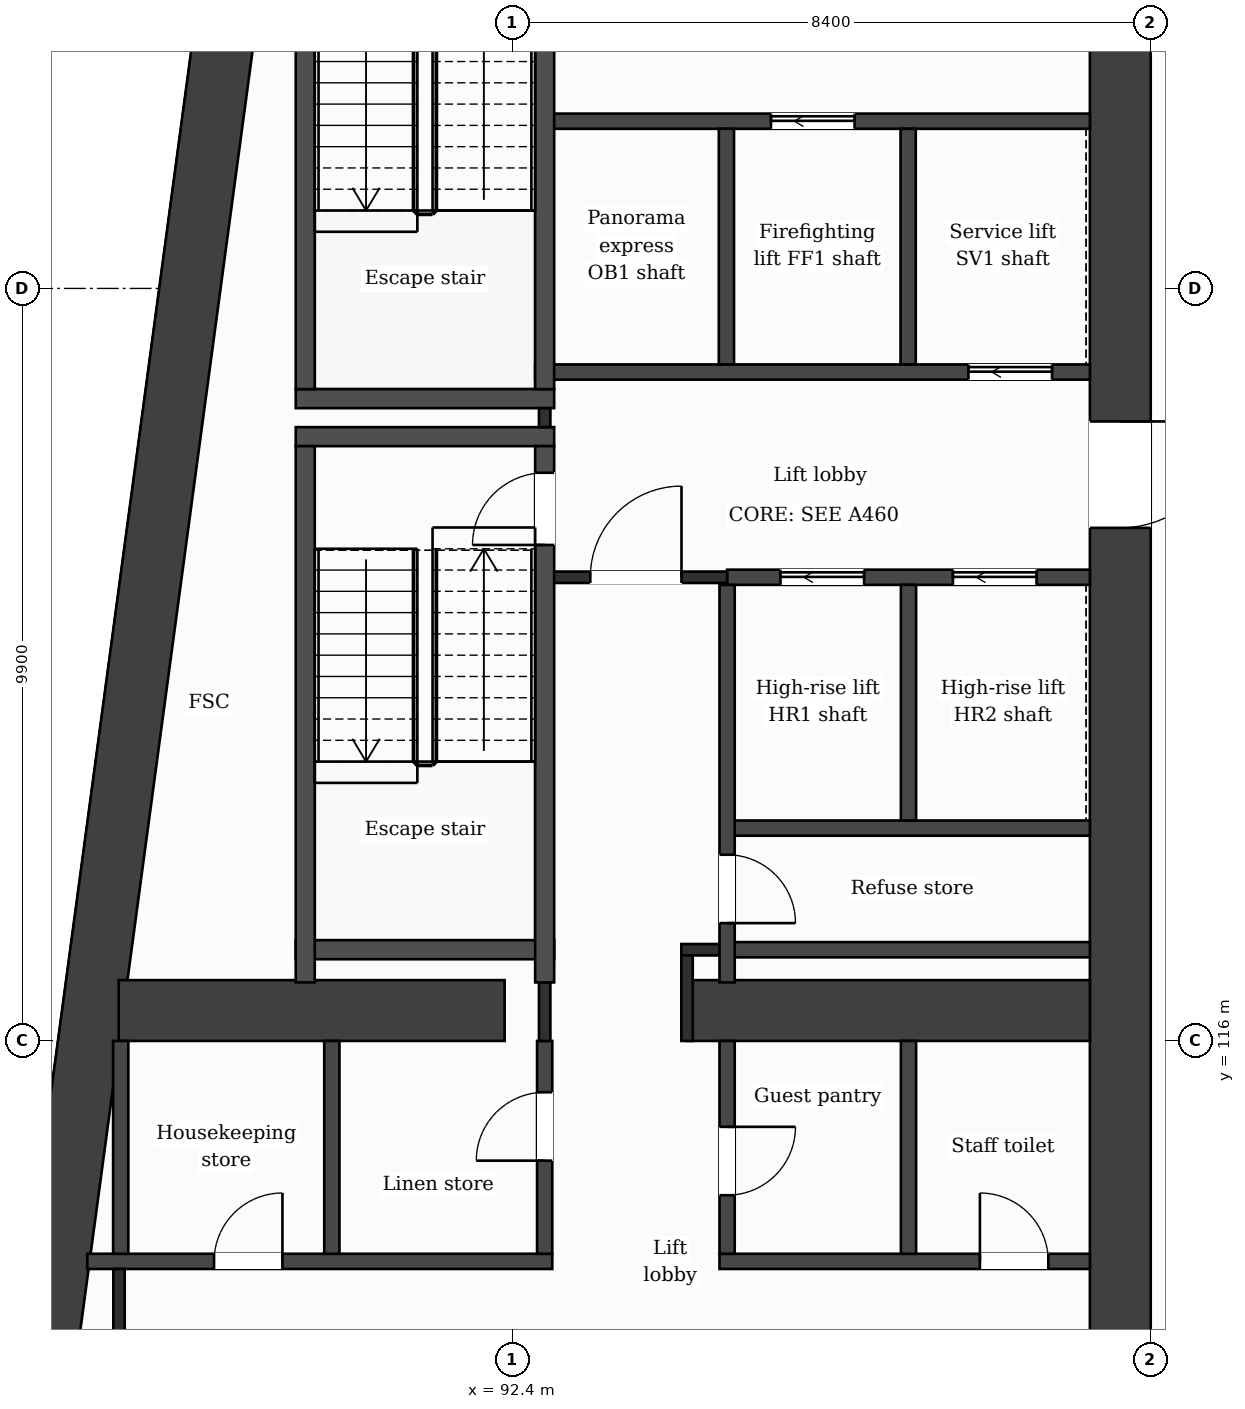
"""IFC4 building model, lengths in metres.
Left out: names, types, materials, properties, quantities, classifications, styles, units other than length and angle.
Written with IfcOpenShell. Run it as: python <this file> out.ifc"""

import sys

from ifc_helpers import new_model, si_unit, direction, frame, frame_2d, origin, place, context, subcontext, project, spatial, rectangle, extrude, element, fill, save


model = new_model("IFC4")
c1 = context("Model", 3, precision=1e-05, world=origin(), true_north=direction((0.0, 1.0)))
c2 = subcontext(c1, "Body", "Model", "MODEL_VIEW")
j1 = project(units=[si_unit("LENGTHUNIT", "METRE"), si_unit("PLANEANGLEUNIT", "RADIAN")], contexts=[c1])
p1 = place(None, origin())
s1 = spatial("IfcSite", under=j1, at=p1, CompositionType="ELEMENT")
p2 = place(p1, origin())
s2 = spatial("IfcBuilding", under=s1, at=p2, CompositionType="ELEMENT")
p3 = place(p2, frame((0.0, 0.0, 242.9)))
s3 = spatial("IfcBuildingStorey", under=s2, at=p3, CompositionType="ELEMENT", Elevation=242.9)
p4 = place(p3, frame((100.4, 132.0, 0.0), z_axis=(0.0, 0.0, 1.0), x_axis=(0.0, -1.0, 0.0)))
e1 = element("IfcWall", 1, at=p4, inside=s3, PredefinedType="SHEAR", context=c2, shape_type="SweptSolid", body=[
    extrude(rectangle(XDim=21.2, YDim=0.8, at=frame_2d((10.6, 0.0))), origin(), (0.0, 0.0, 1.0), 3.7),
])
p5 = place(p4, frame((7.85, 0.0, 0.0)))
e2 = element("IfcOpeningElement", 2, at=p5, cuts=e1, PredefinedType="OPENING", context=c2, shape_type="SweptSolid", body=[
    extrude(rectangle(XDim=1.4, YDim=2.1, at=frame_2d((0.7, 1.05))), frame((0.0, 0.41, 0.0), z_axis=(0.0, -1.0, 0.0), x_axis=(1.0, 0.0, 0.0)), (0.0, 0.0, 1.0), 0.82),
])
p6 = place(p3, frame((86.127, 110.8, 0.0), z_axis=(0.0, 0.0, 1.0), x_axis=(0.133408347329, 0.991061154956, 0.0)))
e3 = element("IfcWall", 3, at=p6, inside=s3, PredefinedType="SHEAR", context=c2, shape_type="SweptSolid", body=[
    extrude(rectangle(XDim=21.391, YDim=0.8, at=frame_2d((10.696, 0.0))), origin(), (0.0, 0.0, 1.0), 3.7),
])
p7 = place(p3, frame((87.223, 116.4, 0.0), z_axis=(0.0, 0.0, 1.0), x_axis=(1.0, 0.0, 0.0)))
e4 = element("IfcWall", 4, at=p7, inside=s3, PredefinedType="SHEAR", context=c2, shape_type="SweptSolid", body=[
    extrude(rectangle(XDim=5.077, YDim=0.8, at=frame_2d((2.539, 0.0))), origin(), (0.0, 0.0, 1.0), 3.7),
])
p8 = place(p3, frame((94.7, 116.4, 0.0), z_axis=(0.0, 0.0, 1.0), x_axis=(1.0, 0.0, 0.0)))
e5 = element("IfcWall", 5, at=p8, inside=s3, PredefinedType="SHEAR", context=c2, shape_type="SweptSolid", body=[
    extrude(rectangle(XDim=5.3, YDim=0.8, at=frame_2d((2.65, 0.0))), origin(), (0.0, 0.0, 1.0), 3.7),
])
p9 = place(p3, frame((86.81, 113.1, 0.0), z_axis=(0.0, 0.0, 1.0), x_axis=(1.0, 0.0, 0.0)))
e6 = element("IfcWall", 6, at=p9, inside=s3, PredefinedType="PARTITIONING", context=c2, shape_type="SweptSolid", body=[
    extrude(rectangle(XDim=6.117, YDim=0.2, at=frame_2d((3.059, 0.0))), origin(), (0.0, 0.0, 1.0), 3.2),
])
p10 = place(p9, frame((1.667, 0.0, 0.0)))
e7 = element("IfcOpeningElement", 7, at=p10, cuts=e6, PredefinedType="OPENING", context=c2, shape_type="SweptSolid", body=[
    extrude(rectangle(XDim=0.9, YDim=2.1, at=frame_2d((0.45, 1.05))), frame((0.0, 0.11, 0.0), z_axis=(0.0, -1.0, 0.0), x_axis=(1.0, 0.0, 0.0)), (0.0, 0.0, 1.0), 0.22),
])
p11 = place(p3, frame((95.127, 113.1, 0.0), z_axis=(0.0, 0.0, 1.0), x_axis=(1.0, 0.0, 0.0)))
e8 = element("IfcWall", 8, at=p11, inside=s3, PredefinedType="PARTITIONING", context=c2, shape_type="SweptSolid", body=[
    extrude(rectangle(XDim=4.873, YDim=0.2, at=frame_2d((2.437, 0.0))), origin(), (0.0, 0.0, 1.0), 3.2),
])
p12 = place(p11, frame((3.426, 0.0, 0.0)))
e9 = element("IfcOpeningElement", 9, at=p12, cuts=e8, PredefinedType="OPENING", context=c2, shape_type="SweptSolid", body=[
    extrude(rectangle(XDim=0.9, YDim=2.1, at=frame_2d((0.45, 1.05))), frame((0.0, 0.11, 0.0), z_axis=(0.0, -1.0, 0.0), x_axis=(1.0, 0.0, 0.0)), (0.0, 0.0, 1.0), 0.22),
])
p13 = place(p3, frame((95.227, 117.2, 0.0), z_axis=(0.0, 0.0, 1.0), x_axis=(1.0, 0.0, 0.0)))
e10 = element("IfcWall", 10, at=p13, inside=s3, PredefinedType="PARTITIONING", context=c2, shape_type="SweptSolid", body=[
    extrude(rectangle(XDim=4.773, YDim=0.2, at=frame_2d((2.386, 0.0))), origin(), (0.0, 0.0, 1.0), 3.2),
])
p14 = place(p3, frame((94.625, 117.2, 0.0), z_axis=(0.0, 0.0, 1.0), x_axis=(1.0, 0.0, 0.0)))
e11 = element("IfcWall", 11, at=p14, inside=s3, PredefinedType="PARTITIONING", context=c2, shape_type="SweptSolid", body=[
    extrude(rectangle(XDim=0.602, YDim=0.15, at=frame_2d((0.301, 0.0))), origin(), (0.0, 0.0, 1.0), 3.2),
])
p15 = place(p3, frame((89.552, 117.2, 0.0), z_axis=(0.0, 0.0, 1.0), x_axis=(1.0, 0.0, 0.0)))
e12 = element("IfcWall", 12, at=p15, inside=s3, PredefinedType="PARTITIONING", context=c2, shape_type="SweptSolid", body=[
    extrude(rectangle(XDim=3.4, YDim=0.25, at=frame_2d((1.7, 0.0))), origin(), (0.0, 0.0, 1.0), 3.2),
])
p16 = place(p3, frame((95.227, 118.8, 0.0), z_axis=(0.0, 0.0, 1.0), x_axis=(1.0, 0.0, 0.0)))
e13 = element("IfcWall", 13, at=p16, inside=s3, PredefinedType="PARTITIONING", context=c2, shape_type="SweptSolid", body=[
    extrude(rectangle(XDim=4.773, YDim=0.2, at=frame_2d((2.386, 0.0))), origin(), (0.0, 0.0, 1.0), 3.2),
])
p17 = place(p3, frame((95.227, 122.1, 0.0), z_axis=(0.0, 0.0, 1.0), x_axis=(1.0, 0.0, 0.0)))
e14 = element("IfcWall", 14, at=p17, inside=s3, PredefinedType="PARTITIONING", context=c2, shape_type="SweptSolid", body=[
    extrude(rectangle(XDim=4.773, YDim=0.2, at=frame_2d((2.386, 0.0))), origin(), (0.0, 0.0, 1.0), 3.2),
])
p18 = place(p17, frame((0.702, 0.0, 0.0)))
e15 = element("IfcOpeningElement", 15, at=p18, cuts=e14, PredefinedType="OPENING", context=c2, shape_type="SweptSolid", body=[
    extrude(rectangle(XDim=1.1, YDim=2.1, at=frame_2d((0.55, 1.05))), frame((0.0, 0.11, 0.0), z_axis=(0.0, -1.0, 0.0), x_axis=(1.0, 0.0, 0.0)), (0.0, 0.0, 1.0), 0.22),
])
p19 = place(p17, frame((2.971, 0.0, 0.0)))
e16 = element("IfcOpeningElement", 16, at=p19, cuts=e14, PredefinedType="OPENING", context=c2, shape_type="SweptSolid", body=[
    extrude(rectangle(XDim=1.1, YDim=2.1, at=frame_2d((0.55, 1.05))), frame((0.0, 0.11, 0.0), z_axis=(0.0, -1.0, 0.0), x_axis=(1.0, 0.0, 0.0)), (0.0, 0.0, 1.0), 0.22),
])
p20 = place(p3, frame((92.827, 122.1, 0.0), z_axis=(0.0, 0.0, 1.0), x_axis=(1.0, 0.0, 0.0)))
e17 = element("IfcWall", 17, at=p20, inside=s3, PredefinedType="PARTITIONING", context=c2, shape_type="SweptSolid", body=[
    extrude(rectangle(XDim=2.4, YDim=0.15, at=frame_2d((1.2, 0.0))), origin(), (0.0, 0.0, 1.0), 3.2),
])
p21 = place(p20, frame((0.6, 0.0, 0.0)))
e18 = element("IfcOpeningElement", 18, at=p21, cuts=e17, PredefinedType="OPENING", context=c2, shape_type="SweptSolid", body=[
    extrude(rectangle(XDim=1.2, YDim=2.1, at=frame_2d((0.6, 1.05))), frame((0.0, 0.085, 0.0), z_axis=(0.0, -1.0, 0.0), x_axis=(1.0, 0.0, 0.0)), (0.0, 0.0, 1.0), 0.17),
])
for number, where, z_axis, x_axis in (
    (19, (89.552, 123.95, 0.0), (0.0, 0.0, 1.0), (1.0, 0.0, 0.0)),
    (20, (89.552, 124.45, 0.0), (0.0, 0.0, 1.0), (1.0, 0.0, 0.0)),
):
    element("IfcWall", number, at=place(p3, frame(where, z_axis=z_axis, x_axis=x_axis)), inside=s3, PredefinedType="PARTITIONING", context=c2, shape_type="SweptSolid", body=[
        extrude(rectangle(XDim=3.4, YDim=0.25, at=frame_2d((1.7, 0.0))), origin(), (0.0, 0.0, 1.0), 3.2),
    ])
p22 = place(p3, frame((92.702, 124.8, 0.0), z_axis=(0.0, 0.0, 1.0), x_axis=(1.0, 0.0, 0.0)))
e21 = element("IfcWall", 21, at=p22, inside=s3, PredefinedType="PARTITIONING", context=c2, shape_type="SweptSolid", body=[
    extrude(rectangle(XDim=7.298, YDim=0.2, at=frame_2d((3.649, 0.0))), origin(), (0.0, 0.0, 1.0), 3.2),
])
p23 = place(p22, frame((5.7, 0.0, 0.0)))
e22 = element("IfcOpeningElement", 22, at=p23, cuts=e21, PredefinedType="OPENING", context=c2, shape_type="SweptSolid", body=[
    extrude(rectangle(XDim=1.1, YDim=2.1, at=frame_2d((0.55, 1.05))), frame((0.0, 0.11, 0.0), z_axis=(0.0, -1.0, 0.0), x_axis=(1.0, 0.0, 0.0)), (0.0, 0.0, 1.0), 0.22),
])
p24 = place(p3, frame((92.827, 128.1, 0.0), z_axis=(0.0, 0.0, 1.0), x_axis=(1.0, 0.0, 0.0)))
e23 = element("IfcWall", 23, at=p24, inside=s3, PredefinedType="PARTITIONING", context=c2, shape_type="SweptSolid", body=[
    extrude(rectangle(XDim=7.173, YDim=0.2, at=frame_2d((3.586, 0.0))), origin(), (0.0, 0.0, 1.0), 3.2),
])
p25 = place(p24, frame((2.977, 0.0, 0.0)))
e24 = element("IfcOpeningElement", 24, at=p25, cuts=e23, PredefinedType="OPENING", context=c2, shape_type="SweptSolid", body=[
    extrude(rectangle(XDim=1.1, YDim=2.1, at=frame_2d((0.55, 1.05))), frame((0.0, 0.11, 0.0), z_axis=(0.0, -1.0, 0.0), x_axis=(1.0, 0.0, 0.0)), (0.0, 0.0, 1.0), 0.22),
])
p26 = place(p3, frame((87.25, 113.2, 0.0), z_axis=(0.0, 0.0, 1.0), x_axis=(0.0, 1.0, 0.0)))
e25 = element("IfcWall", 25, at=p26, inside=s3, PredefinedType="PARTITIONING", context=c2, shape_type="SweptSolid", body=[
    extrude(rectangle(XDim=2.8, YDim=0.2, at=frame_2d((1.4, 0.0))), origin(), (0.0, 0.0, 1.0), 3.2),
])
p27 = place(p3, frame((87.227, 111.2, 0.0), z_axis=(0.0, 0.0, 1.0), x_axis=(0.0, 1.0, 0.0)))
e26 = element("IfcWall", 26, at=p27, inside=s3, PredefinedType="PARTITIONING", context=c2, shape_type="SweptSolid", body=[
    extrude(rectangle(XDim=1.8, YDim=0.15, at=frame_2d((0.9, 0.0))), origin(), (0.0, 0.0, 1.0), 3.2),
])
for number, where, z_axis, x_axis in (
    (27, (89.677, 116.77, 0.0), (0.0, 0.0, 1.0), (0.0, 1.0, 0.0)),
    (28, (89.677, 124.575, 0.0), (0.0, 0.0, 1.0), (0.0, 1.0, 0.0)),
):
    element("IfcWall", number, at=place(p3, frame(where, z_axis=z_axis, x_axis=x_axis)), inside=s3, PredefinedType="PARTITIONING", context=c2, shape_type="SweptSolid", body=[
        extrude(rectangle(XDim=7.055, YDim=0.25, at=frame_2d((3.527, 0.0))), origin(), (0.0, 0.0, 1.0), 3.2),
    ])
p28 = place(p3, frame((90.027, 113.2, 0.0), z_axis=(0.0, 0.0, 1.0), x_axis=(0.0, 1.0, 0.0)))
e29 = element("IfcWall", 29, at=p28, inside=s3, PredefinedType="PARTITIONING", context=c2, shape_type="SweptSolid", body=[
    extrude(rectangle(XDim=2.8, YDim=0.2, at=frame_2d((1.4, 0.0))), origin(), (0.0, 0.0, 1.0), 3.2),
])
p29 = place(p3, frame((92.827, 113.2, 0.0), z_axis=(0.0, 0.0, 1.0), x_axis=(0.0, 1.0, 0.0)))
e30 = element("IfcWall", 30, at=p29, inside=s3, PredefinedType="PARTITIONING", context=c2, shape_type="SweptSolid", body=[
    extrude(rectangle(XDim=2.8, YDim=0.2, at=frame_2d((1.4, 0.0))), origin(), (0.0, 0.0, 1.0), 3.2),
])
p30 = place(p29, frame((1.225, 0.0, 0.0)))
e31 = element("IfcOpeningElement", 31, at=p30, cuts=e30, PredefinedType="OPENING", context=c2, shape_type="SweptSolid", body=[
    extrude(rectangle(XDim=0.9, YDim=2.1, at=frame_2d((0.45, 1.05))), frame((0.0, 0.11, 0.0), z_axis=(0.0, -1.0, 0.0), x_axis=(1.0, 0.0, 0.0)), (0.0, 0.0, 1.0), 0.22),
])
p31 = place(p3, frame((92.827, 116.0, 0.0), z_axis=(0.0, 0.0, 1.0), x_axis=(0.0, 1.0, 0.0)))
e32 = element("IfcWall", 32, at=p31, inside=s3, PredefinedType="PARTITIONING", context=c2, shape_type="SweptSolid", body=[
    extrude(rectangle(XDim=0.77, YDim=0.15, at=frame_2d((0.385, 0.0))), origin(), (0.0, 0.0, 1.0), 3.2),
])
p32 = place(p3, frame((92.827, 124.075, 0.0), z_axis=(0.0, 0.0, 1.0), x_axis=(0.0, 1.0, 0.0)))
e33 = element("IfcWall", 33, at=p32, inside=s3, PredefinedType="PARTITIONING", context=c2, shape_type="SweptSolid", body=[
    extrude(rectangle(XDim=0.25, YDim=0.15, at=frame_2d((0.125, 0.0))), origin(), (0.0, 0.0, 1.0), 3.2),
])
p33 = place(p3, frame((92.827, 116.77, 0.0), z_axis=(0.0, 0.0, 1.0), x_axis=(0.0, 1.0, 0.0)))
e34 = element("IfcWall", 34, at=p33, inside=s3, PredefinedType="PARTITIONING", context=c2, shape_type="SweptSolid", body=[
    extrude(rectangle(XDim=7.055, YDim=0.25, at=frame_2d((3.527, 0.0))), origin(), (0.0, 0.0, 1.0), 3.2),
])
p34 = place(p33, frame((5.755, 0.0, 0.0)))
e35 = element("IfcOpeningElement", 35, at=p34, cuts=e34, PredefinedType="OPENING", context=c2, shape_type="SweptSolid", body=[
    extrude(rectangle(XDim=0.95, YDim=2.1, at=frame_2d((0.475, 1.05))), frame((0.0, 0.135, 0.0), z_axis=(0.0, -1.0, 0.0), x_axis=(1.0, 0.0, 0.0)), (0.0, 0.0, 1.0), 0.27),
])
p35 = place(p3, frame((92.827, 124.575, 0.0), z_axis=(0.0, 0.0, 1.0), x_axis=(0.0, 1.0, 0.0)))
e36 = element("IfcWall", 36, at=p35, inside=s3, PredefinedType="PARTITIONING", context=c2, shape_type="SweptSolid", body=[
    extrude(rectangle(XDim=7.055, YDim=0.25, at=frame_2d((3.527, 0.0))), origin(), (0.0, 0.0, 1.0), 3.2),
])
p36 = place(p35, frame((5.325, 0.0, 0.0)))
e37 = element("IfcOpeningElement", 37, at=p36, cuts=e36, PredefinedType="OPENING", context=c2, shape_type="SweptSolid", body=[
    extrude(rectangle(XDim=1.0, YDim=2.1, at=frame_2d((0.5, 1.05))), frame((0.0, 0.135, 0.0), z_axis=(0.0, -1.0, 0.0), x_axis=(1.0, 0.0, 0.0)), (0.0, 0.0, 1.0), 0.27),
])
p37 = place(p3, frame((94.7, 116.0, 0.0), z_axis=(0.0, 0.0, 1.0), x_axis=(0.0, 1.0, 0.0)))
e38 = element("IfcWall", 38, at=p37, inside=s3, PredefinedType="PARTITIONING", context=c2, shape_type="SweptSolid", body=[
    extrude(rectangle(XDim=1.125, YDim=0.15, at=frame_2d((0.562, 0.0))), origin(), (0.0, 0.0, 1.0), 3.2),
])
p38 = place(p3, frame((95.218, 124.9, 0.0), z_axis=(0.0, 0.0, 1.0), x_axis=(0.0, 1.0, 0.0)))
e39 = element("IfcWall", 39, at=p38, inside=s3, PredefinedType="PARTITIONING", context=c2, shape_type="SweptSolid", body=[
    extrude(rectangle(XDim=3.1, YDim=0.2, at=frame_2d((1.55, 0.0))), origin(), (0.0, 0.0, 1.0), 3.2),
])
p39 = place(p3, frame((95.227, 113.2, 0.0), z_axis=(0.0, 0.0, 1.0), x_axis=(0.0, 1.0, 0.0)))
e40 = element("IfcWall", 40, at=p39, inside=s3, PredefinedType="PARTITIONING", context=c2, shape_type="SweptSolid", body=[
    extrude(rectangle(XDim=2.8, YDim=0.2, at=frame_2d((1.4, 0.0))), origin(), (0.0, 0.0, 1.0), 3.2),
])
p40 = place(p39, frame((0.77, 0.0, 0.0)))
e41 = element("IfcOpeningElement", 41, at=p40, cuts=e40, PredefinedType="OPENING", context=c2, shape_type="SweptSolid", body=[
    extrude(rectangle(XDim=0.9, YDim=2.1, at=frame_2d((0.45, 1.05))), frame((0.0, 0.11, 0.0), z_axis=(0.0, -1.0, 0.0), x_axis=(1.0, 0.0, 0.0)), (0.0, 0.0, 1.0), 0.22),
])
p41 = place(p3, frame((95.227, 116.77, 0.0), z_axis=(0.0, 0.0, 1.0), x_axis=(0.0, 1.0, 0.0)))
e42 = element("IfcWall", 42, at=p41, inside=s3, PredefinedType="PARTITIONING", context=c2, shape_type="SweptSolid", body=[
    extrude(rectangle(XDim=5.23, YDim=0.2, at=frame_2d((2.615, 0.0))), origin(), (0.0, 0.0, 1.0), 3.2),
])
p42 = place(p41, frame((0.78, 0.0, 0.0)))
e43 = element("IfcOpeningElement", 43, at=p42, cuts=e42, PredefinedType="OPENING", context=c2, shape_type="SweptSolid", body=[
    extrude(rectangle(XDim=0.9, YDim=2.1, at=frame_2d((0.45, 1.05))), frame((0.0, 0.11, 0.0), z_axis=(0.0, -1.0, 0.0), x_axis=(1.0, 0.0, 0.0)), (0.0, 0.0, 1.0), 0.22),
])
p43 = place(p3, frame((97.609, 124.9, 0.0), z_axis=(0.0, 0.0, 1.0), x_axis=(0.0, 1.0, 0.0)))
e44 = element("IfcWall", 44, at=p43, inside=s3, PredefinedType="PARTITIONING", context=c2, shape_type="SweptSolid", body=[
    extrude(rectangle(XDim=3.1, YDim=0.2, at=frame_2d((1.55, 0.0))), origin(), (0.0, 0.0, 1.0), 3.2),
])
p44 = place(p3, frame((97.614, 113.2, 0.0), z_axis=(0.0, 0.0, 1.0), x_axis=(0.0, 1.0, 0.0)))
e45 = element("IfcWall", 45, at=p44, inside=s3, PredefinedType="PARTITIONING", context=c2, shape_type="SweptSolid", body=[
    extrude(rectangle(XDim=2.8, YDim=0.2, at=frame_2d((1.4, 0.0))), origin(), (0.0, 0.0, 1.0), 3.2),
])
p45 = place(p3, frame((97.614, 118.9, 0.0), z_axis=(0.0, 0.0, 1.0), x_axis=(0.0, 1.0, 0.0)))
e46 = element("IfcWall", 46, at=p45, inside=s3, PredefinedType="PARTITIONING", context=c2, shape_type="SweptSolid", body=[
    extrude(rectangle(XDim=3.1, YDim=0.2, at=frame_2d((1.55, 0.0))), origin(), (0.0, 0.0, 1.0), 3.2),
])
p46 = place(p21, origin())
e47 = element("IfcDoor", 47, at=p46, inside=s3, OperationType="SINGLE_SWING_RIGHT", PredefinedType="DOOR", context=c2, shape_type="SweptSolid", body=[
    extrude(rectangle(XDim=1.2, YDim=2.1, at=frame_2d((0.6, 1.05))), frame((0.0, 0.025, 0.0), z_axis=(0.0, -1.0, 0.0), x_axis=(1.0, 0.0, 0.0)), (0.0, 0.0, 1.0), 0.05),
])
fill(e18, e47)
p47 = place(p18, origin())
e48 = element("IfcDoor", 48, at=p47, inside=s3, OperationType="SLIDING_TO_LEFT", PredefinedType="DOOR", context=c2, shape_type="SweptSolid", body=[
    extrude(rectangle(XDim=1.1, YDim=2.1, at=frame_2d((0.55, 1.05))), frame((0.0, 0.025, 0.0), z_axis=(0.0, -1.0, 0.0), x_axis=(1.0, 0.0, 0.0)), (0.0, 0.0, 1.0), 0.05),
])
fill(e15, e48)
p48 = place(p19, origin())
e49 = element("IfcDoor", 49, at=p48, inside=s3, OperationType="SLIDING_TO_LEFT", PredefinedType="DOOR", context=c2, shape_type="SweptSolid", body=[
    extrude(rectangle(XDim=1.1, YDim=2.1, at=frame_2d((0.55, 1.05))), frame((0.0, 0.025, 0.0), z_axis=(0.0, -1.0, 0.0), x_axis=(1.0, 0.0, 0.0)), (0.0, 0.0, 1.0), 0.05),
])
fill(e16, e49)
p49 = place(p25, origin())
e50 = element("IfcDoor", 50, at=p49, inside=s3, OperationType="SLIDING_TO_LEFT", PredefinedType="DOOR", context=c2, shape_type="SweptSolid", body=[
    extrude(rectangle(XDim=1.1, YDim=2.1, at=frame_2d((0.55, 1.05))), frame((0.0, 0.025, 0.0), z_axis=(0.0, -1.0, 0.0), x_axis=(1.0, 0.0, 0.0)), (0.0, 0.0, 1.0), 0.05),
])
fill(e24, e50)
p50 = place(p23, origin())
e51 = element("IfcDoor", 51, at=p50, inside=s3, OperationType="SLIDING_TO_LEFT", PredefinedType="DOOR", context=c2, shape_type="SweptSolid", body=[
    extrude(rectangle(XDim=1.1, YDim=2.1, at=frame_2d((0.55, 1.05))), frame((0.0, 0.025, 0.0), z_axis=(0.0, -1.0, 0.0), x_axis=(1.0, 0.0, 0.0)), (0.0, 0.0, 1.0), 0.05),
])
fill(e22, e51)
p51 = place(p34, origin())
e52 = element("IfcDoor", 52, at=p51, inside=s3, OperationType="SINGLE_SWING_LEFT", PredefinedType="DOOR", context=c2, shape_type="SweptSolid", body=[
    extrude(rectangle(XDim=0.95, YDim=2.1, at=frame_2d((0.475, 1.05))), frame((0.0, 0.025, 0.0), z_axis=(0.0, -1.0, 0.0), x_axis=(1.0, 0.0, 0.0)), (0.0, 0.0, 1.0), 0.05),
])
fill(e35, e52)
p52 = place(p42, origin())
e53 = element("IfcDoor", 53, at=p52, inside=s3, OperationType="SINGLE_SWING_LEFT", PredefinedType="DOOR", context=c2, shape_type="SweptSolid", body=[
    extrude(rectangle(XDim=0.9, YDim=2.1, at=frame_2d((0.45, 1.05))), frame((0.0, 0.025, 0.0), z_axis=(0.0, -1.0, 0.0), x_axis=(1.0, 0.0, 0.0)), (0.0, 0.0, 1.0), 0.05),
])
fill(e43, e53)
p53 = place(p10, origin())
e54 = element("IfcDoor", 54, at=p53, inside=s3, OperationType="SINGLE_SWING_RIGHT", PredefinedType="DOOR", context=c2, shape_type="SweptSolid", body=[
    extrude(rectangle(XDim=0.9, YDim=2.1, at=frame_2d((0.45, 1.05))), frame((0.0, 0.025, 0.0), z_axis=(0.0, -1.0, 0.0), x_axis=(1.0, 0.0, 0.0)), (0.0, 0.0, 1.0), 0.05),
])
fill(e7, e54)
p54 = place(p30, origin())
e55 = element("IfcDoor", 55, at=p54, inside=s3, OperationType="SINGLE_SWING_LEFT", PredefinedType="DOOR", context=c2, shape_type="SweptSolid", body=[
    extrude(rectangle(XDim=0.9, YDim=2.1, at=frame_2d((0.45, 1.05))), frame((0.0, 0.025, 0.0), z_axis=(0.0, -1.0, 0.0), x_axis=(1.0, 0.0, 0.0)), (0.0, 0.0, 1.0), 0.05),
])
fill(e31, e55)
p55 = place(p40, origin())
e56 = element("IfcDoor", 56, at=p55, inside=s3, OperationType="SINGLE_SWING_RIGHT", PredefinedType="DOOR", context=c2, shape_type="SweptSolid", body=[
    extrude(rectangle(XDim=0.9, YDim=2.1, at=frame_2d((0.45, 1.05))), frame((0.0, 0.025, 0.0), z_axis=(0.0, -1.0, 0.0), x_axis=(1.0, 0.0, 0.0)), (0.0, 0.0, 1.0), 0.05),
])
fill(e41, e56)
p56 = place(p12, origin())
e57 = element("IfcDoor", 57, at=p56, inside=s3, OperationType="SINGLE_SWING_LEFT", PredefinedType="DOOR", context=c2, shape_type="SweptSolid", body=[
    extrude(rectangle(XDim=0.9, YDim=2.1, at=frame_2d((0.45, 1.05))), frame((0.0, 0.025, 0.0), z_axis=(0.0, -1.0, 0.0), x_axis=(1.0, 0.0, 0.0)), (0.0, 0.0, 1.0), 0.05),
])
fill(e9, e57)
p57 = place(p5, origin())
e58 = element("IfcDoor", 58, at=p57, inside=s3, OperationType="SINGLE_SWING_LEFT", PredefinedType="DOOR", context=c2, shape_type="SweptSolid", body=[
    extrude(rectangle(XDim=1.4, YDim=2.1, at=frame_2d((0.7, 1.05))), frame((0.0, 0.025, 0.0), z_axis=(0.0, -1.0, 0.0), x_axis=(1.0, 0.0, 0.0)), (0.0, 0.0, 1.0), 0.05),
])
fill(e2, e58)
save(model, sys.argv[1])
